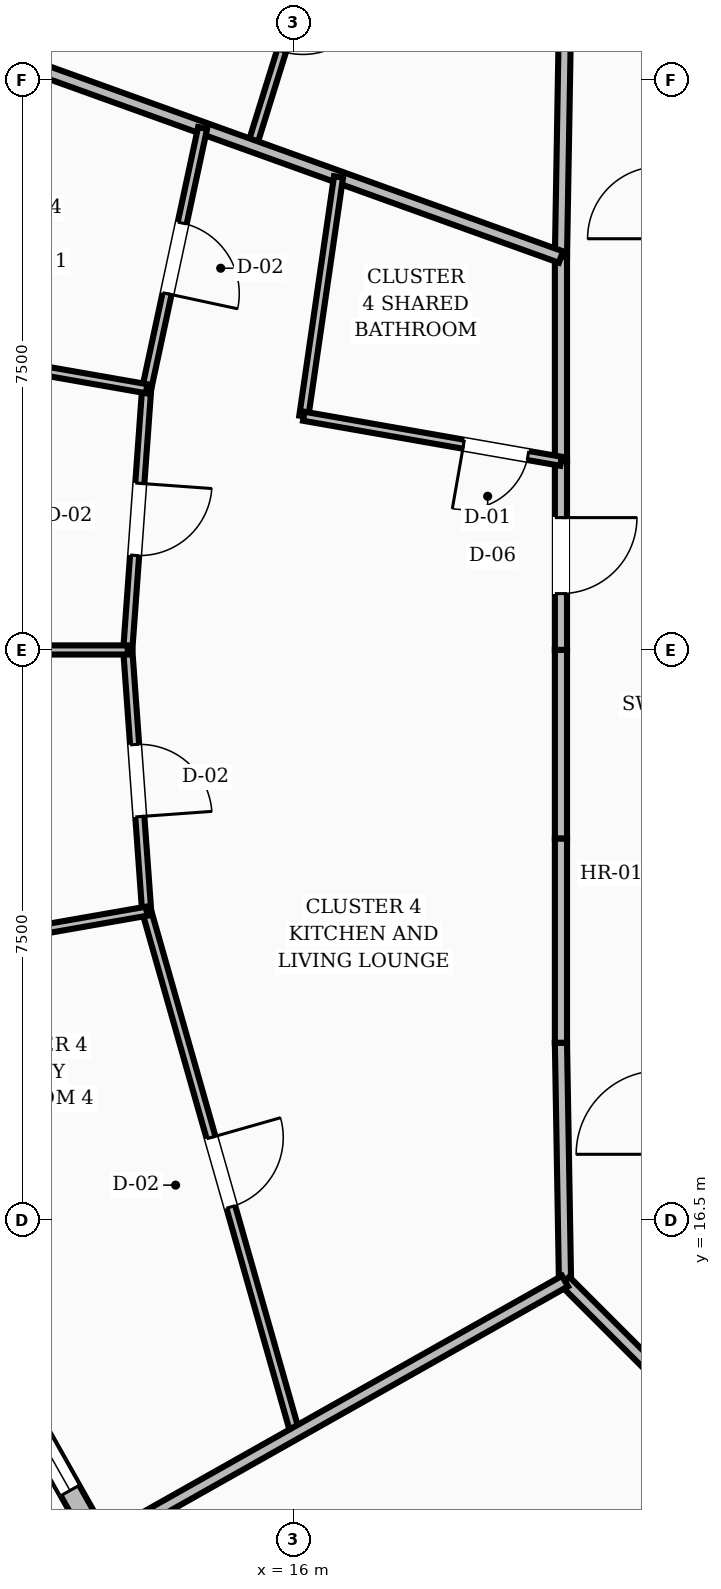
"""IFC4 building model, lengths in metres.
Left out: names, types, materials, properties, quantities, classifications, styles, units other than length and angle.
Written with IfcOpenShell. Run it as: python <this file> out.ifc"""

import sys

from ifc_helpers import new_model, si_unit, direction, frame, frame_2d, origin, place, context, subcontext, project, spatial, rectangle, extrude, element, fill, save


model = new_model("IFC4")
c1 = context("Model", 3, precision=1e-05, world=origin(), true_north=direction((0.0, 1.0)))
c2 = subcontext(c1, "Body", "Model", "MODEL_VIEW")
j1 = project(units=[si_unit("LENGTHUNIT", "METRE"), si_unit("PLANEANGLEUNIT", "RADIAN")], contexts=[c1])
p1 = place(None, origin())
s1 = spatial("IfcSite", under=j1, at=p1, CompositionType="ELEMENT")
p2 = place(p1, origin())
s2 = spatial("IfcBuilding", under=s1, at=p2, CompositionType="ELEMENT")
p3 = place(p2, frame((0.0, 0.0, 232.8)))
s3 = spatial("IfcBuildingStorey", under=s2, at=p3, CompositionType="ELEMENT", Elevation=232.8)
p4 = place(p3, frame((11.392, 15.903, 0.0), z_axis=(0.0, 0.0, 1.0), x_axis=(0.490926410902, -0.871201044007, 0.0)))
e1 = element("IfcWall", 1, at=p4, inside=s3, PredefinedType="STANDARD", context=c2, shape_type="SweptSolid", body=[
    extrude(rectangle(XDim=4.199, YDim=0.28, at=frame_2d((2.099, 0.0))), origin(), (0.0, 0.0, 1.0), 2.88),
])
p5 = place(p4, frame((0.799, 0.0, 0.8)))
e2 = element("IfcOpeningElement", 2, at=p5, cuts=e1, PredefinedType="OPENING", context=c2, shape_type="SweptSolid", body=[
    extrude(rectangle(XDim=2.6, YDim=1.65, at=frame_2d((1.3, 0.825))), frame((0.0, 0.15, 0.0), z_axis=(0.0, -1.0, 0.0), x_axis=(1.0, 0.0, 0.0)), (0.0, 0.0, 1.0), 0.3),
])
p6 = place(p3, frame((19.573, 32.303, 0.0), z_axis=(0.0, 0.0, 1.0), x_axis=(-0.016981035134, -0.999855811828, 0.0)))
e3 = element("IfcWall", 3, at=p6, inside=s3, PredefinedType="SOLIDWALL", context=c2, shape_type="SweptSolid", body=[
    extrude(rectangle(XDim=3.134, YDim=0.16, at=frame_2d((1.567, 0.0))), origin(), (0.0, 0.0, 1.0), 2.87),
])
p7 = place(p3, frame((19.52, 29.169, 0.0), z_axis=(0.0, 0.0, 1.0), x_axis=(0.0, -1.0, 0.0)))
e4 = element("IfcWall", 4, at=p7, inside=s3, PredefinedType="SOLIDWALL", context=c2, shape_type="SweptSolid", body=[
    extrude(rectangle(XDim=2.687, YDim=0.16, at=frame_2d((1.344, 0.0))), origin(), (0.0, 0.0, 1.0), 2.87),
])
p8 = place(p3, frame((19.52, 26.482, 0.0), z_axis=(0.0, 0.0, 1.0), x_axis=(0.0, -1.0, 0.0)))
e5 = element("IfcWall", 5, at=p8, inside=s3, PredefinedType="SOLIDWALL", context=c2, shape_type="SweptSolid", body=[
    extrude(rectangle(XDim=2.482, YDim=0.16, at=frame_2d((1.241, 0.0))), origin(), (0.0, 0.0, 1.0), 2.87),
])
p9 = place(p8, frame((0.741, 0.0, 0.0)))
e6 = element("IfcOpeningElement", 6, at=p9, cuts=e5, PredefinedType="OPENING", context=c2, shape_type="SweptSolid", body=[
    extrude(rectangle(XDim=1.0, YDim=2.1, at=frame_2d((0.5, 1.05))), frame((0.0, 0.09, 0.0), z_axis=(0.0, -1.0, 0.0), x_axis=(1.0, 0.0, 0.0)), (0.0, 0.0, 1.0), 0.18),
])
p10 = place(p3, frame((19.52, 24.0, 0.0), z_axis=(0.0, 0.0, 1.0), x_axis=(0.0, -1.0, 0.0)))
e7 = element("IfcWall", 7, at=p10, inside=s3, PredefinedType="SOLIDWALL", context=c2, shape_type="SweptSolid", body=[
    extrude(rectangle(XDim=2.482, YDim=0.16, at=frame_2d((1.241, 0.0))), origin(), (0.0, 0.0, 1.0), 2.87),
])
p11 = place(p3, frame((19.52, 21.518, 0.0), z_axis=(0.0, 0.0, 1.0), x_axis=(0.0, -1.0, 0.0)))
e8 = element("IfcWall", 8, at=p11, inside=s3, PredefinedType="SOLIDWALL", context=c2, shape_type="SweptSolid", body=[
    extrude(rectangle(XDim=2.687, YDim=0.16, at=frame_2d((1.344, 0.0))), origin(), (0.0, 0.0, 1.0), 2.87),
])
p12 = place(p3, frame((19.52, 18.831, 0.0), z_axis=(0.0, 0.0, 1.0), x_axis=(0.016981035134, -0.999855811828, 0.0)))
e9 = element("IfcWall", 9, at=p12, inside=s3, PredefinedType="SOLIDWALL", context=c2, shape_type="SweptSolid", body=[
    extrude(rectangle(XDim=3.134, YDim=0.16, at=frame_2d((1.567, 0.0))), origin(), (0.0, 0.0, 1.0), 2.87),
])
p13 = place(p3, frame((19.573, 15.697, 0.0), z_axis=(0.0, 0.0, 1.0), x_axis=(0.707106781187, -0.707106781187, 0.0)))
e10 = element("IfcWall", 10, at=p13, inside=s3, PredefinedType="SOLIDWALL", context=c2, shape_type="SweptSolid", body=[
    extrude(rectangle(XDim=2.916, YDim=0.16, at=frame_2d((1.458, 0.0))), origin(), (0.0, 0.0, 1.0), 2.87),
])
p14 = place(p3, frame((16.513, 34.029, 0.0), z_axis=(0.0, 0.0, 1.0), x_axis=(-0.297239013816, -0.954803104658, 0.0)))
e11 = element("IfcWall", 11, at=p14, inside=s3, PredefinedType="PARTITIONING", context=c2, shape_type="SweptSolid", body=[
    extrude(rectangle(XDim=3.556, YDim=0.12, at=frame_2d((1.778, 0.0))), origin(), (0.0, 0.0, 1.0), 2.87),
])
p15 = place(p14, frame((1.303, 0.0, 0.0)))
e12 = element("IfcOpeningElement", 12, at=p15, cuts=e11, PredefinedType="OPENING", context=c2, shape_type="SweptSolid", body=[
    extrude(rectangle(XDim=0.95, YDim=2.1, at=frame_2d((0.475, 1.05))), frame((0.0, 0.07, 0.0), z_axis=(0.0, -1.0, 0.0), x_axis=(1.0, 0.0, 0.0)), (0.0, 0.0, 1.0), 0.14),
])
p16 = place(p3, frame((19.52, 29.169, 0.0), z_axis=(0.0, 0.0, 1.0), x_axis=(-0.940833047992, 0.338870441032, 0.0)))
e13 = element("IfcWall", 13, at=p16, inside=s3, PredefinedType="SOLIDWALL", context=c2, shape_type="SweptSolid", body=[
    extrude(rectangle(XDim=8.589, YDim=0.16, at=frame_2d((4.295, 0.0))), origin(), (0.0, 0.0, 1.0), 2.87),
])
p17 = place(p3, frame((16.594, 30.223, 0.0), z_axis=(0.0, 0.0, 1.0), x_axis=(-0.14364473036, -0.98962932022, 0.0)))
e14 = element("IfcWall", 14, at=p17, inside=s3, PredefinedType="PARTITIONING", context=c2, shape_type="SweptSolid", body=[
    extrude(rectangle(XDim=3.182, YDim=0.12, at=frame_2d((1.591, 0.0))), origin(), (0.0, 0.0, 1.0), 2.87),
])
p18 = place(p3, frame((19.52, 26.482, 0.0), z_axis=(0.0, 0.0, 1.0), x_axis=(-0.985018092724, 0.172451027852, 0.0)))
e15 = element("IfcWall", 15, at=p18, inside=s3, PredefinedType="PARTITIONING", context=c2, shape_type="SweptSolid", body=[
    extrude(rectangle(XDim=3.435, YDim=0.12, at=frame_2d((1.717, 0.0))), origin(), (0.0, 0.0, 1.0), 2.87),
])
p19 = place(p18, frame((0.44, 0.0, 0.0)))
e16 = element("IfcOpeningElement", 16, at=p19, cuts=e15, PredefinedType="OPENING", context=c2, shape_type="SweptSolid", body=[
    extrude(rectangle(XDim=0.86, YDim=2.1, at=frame_2d((0.43, 1.05))), frame((0.0, 0.07, 0.0), z_axis=(0.0, -1.0, 0.0), x_axis=(1.0, 0.0, 0.0)), (0.0, 0.0, 1.0), 0.14),
])
p20 = place(p3, frame((14.806, 30.867, 0.0), z_axis=(0.0, 0.0, 1.0), x_axis=(-0.209866475618, -0.977730056003, 0.0)))
e17 = element("IfcWall", 17, at=p20, inside=s3, PredefinedType="PARTITIONING", context=c2, shape_type="SweptSolid", body=[
    extrude(rectangle(XDim=3.509, YDim=0.12, at=frame_2d((1.754, 0.0))), origin(), (0.0, 0.0, 1.0), 2.87),
])
p21 = place(p20, frame((1.279, 0.0, 0.0)))
e18 = element("IfcOpeningElement", 18, at=p21, cuts=e17, PredefinedType="OPENING", context=c2, shape_type="SweptSolid", body=[
    extrude(rectangle(XDim=0.95, YDim=2.1, at=frame_2d((0.475, 1.05))), frame((0.0, 0.07, 0.0), z_axis=(0.0, -1.0, 0.0), x_axis=(1.0, 0.0, 0.0)), (0.0, 0.0, 1.0), 0.14),
])
p22 = place(p3, frame((14.07, 27.437, 0.0), z_axis=(0.0, 0.0, 1.0), x_axis=(-0.072128186897, -0.99739537028, 0.0)))
e19 = element("IfcWall", 19, at=p22, inside=s3, PredefinedType="PARTITIONING", context=c2, shape_type="SweptSolid", body=[
    extrude(rectangle(XDim=3.446, YDim=0.12, at=frame_2d((1.723, 0.0))), origin(), (0.0, 0.0, 1.0), 2.87),
])
p23 = place(p22, frame((1.248, 0.0, 0.0)))
e20 = element("IfcOpeningElement", 20, at=p23, cuts=e19, PredefinedType="OPENING", context=c2, shape_type="SweptSolid", body=[
    extrude(rectangle(XDim=0.95, YDim=2.1, at=frame_2d((0.475, 1.05))), frame((0.0, 0.07, 0.0), z_axis=(0.0, -1.0, 0.0), x_axis=(1.0, 0.0, 0.0)), (0.0, 0.0, 1.0), 0.14),
])
p24 = place(p3, frame((14.07, 27.437, 0.0), z_axis=(0.0, 0.0, 1.0), x_axis=(-0.985016843907, 0.172458160782, 0.0)))
e21 = element("IfcWall", 21, at=p24, inside=s3, PredefinedType="PARTITIONING", context=c2, shape_type="SweptSolid", body=[
    extrude(rectangle(XDim=3.957, YDim=0.12, at=frame_2d((1.979, 0.0))), origin(), (0.0, 0.0, 1.0), 2.87),
])
p25 = place(p3, frame((13.821, 24.0, 0.0), z_axis=(0.0, 0.0, 1.0), x_axis=(0.072128186897, -0.99739537028, 0.0)))
e22 = element("IfcWall", 22, at=p25, inside=s3, PredefinedType="PARTITIONING", context=c2, shape_type="SweptSolid", body=[
    extrude(rectangle(XDim=3.446, YDim=0.12, at=frame_2d((1.723, 0.0))), origin(), (0.0, 0.0, 1.0), 2.87),
])
p26 = place(p25, frame((1.248, 0.0, 0.0)))
e23 = element("IfcOpeningElement", 23, at=p26, cuts=e22, PredefinedType="OPENING", context=c2, shape_type="SweptSolid", body=[
    extrude(rectangle(XDim=0.95, YDim=2.1, at=frame_2d((0.475, 1.05))), frame((0.0, 0.07, 0.0), z_axis=(0.0, -1.0, 0.0), x_axis=(1.0, 0.0, 0.0)), (0.0, 0.0, 1.0), 0.14),
])
p27 = place(p3, frame((13.821, 24.0, 0.0), z_axis=(0.0, 0.0, 1.0), x_axis=(-1.0, 0.0, 0.0)))
e24 = element("IfcWall", 24, at=p27, inside=s3, PredefinedType="PARTITIONING", context=c2, shape_type="SweptSolid", body=[
    extrude(rectangle(XDim=4.077, YDim=0.12, at=frame_2d((2.039, 0.0))), origin(), (0.0, 0.0, 1.0), 2.87),
])
p28 = place(p3, frame((14.07, 20.563, 0.0), z_axis=(0.0, 0.0, 1.0), x_axis=(0.273646270328, -0.961830400193, 0.0)))
e25 = element("IfcWall", 25, at=p28, inside=s3, PredefinedType="PARTITIONING", context=c2, shape_type="SweptSolid", body=[
    extrude(rectangle(XDim=7.141, YDim=0.12, at=frame_2d((3.57, 0.0))), origin(), (0.0, 0.0, 1.0), 2.87),
])
p29 = place(p28, frame((3.095, 0.0, 0.0)))
e26 = element("IfcOpeningElement", 26, at=p29, cuts=e25, PredefinedType="OPENING", context=c2, shape_type="SweptSolid", body=[
    extrude(rectangle(XDim=0.95, YDim=2.1, at=frame_2d((0.475, 1.05))), frame((0.0, 0.07, 0.0), z_axis=(0.0, -1.0, 0.0), x_axis=(1.0, 0.0, 0.0)), (0.0, 0.0, 1.0), 0.14),
])
p30 = place(p3, frame((14.07, 20.563, 0.0), z_axis=(0.0, 0.0, 1.0), x_axis=(-0.985016843907, -0.172458160782, 0.0)))
e27 = element("IfcWall", 27, at=p30, inside=s3, PredefinedType="PARTITIONING", context=c2, shape_type="SweptSolid", body=[
    extrude(rectangle(XDim=3.957, YDim=0.12, at=frame_2d((1.979, 0.0))), origin(), (0.0, 0.0, 1.0), 2.87),
])
p31 = place(p3, frame((19.573, 15.697, 0.0), z_axis=(0.0, 0.0, 1.0), x_axis=(-0.87102262413, -0.491242901479, 0.0)))
e28 = element("IfcWall", 28, at=p31, inside=s3, PredefinedType="SOLIDWALL", context=c2, shape_type="SweptSolid", body=[
    extrude(rectangle(XDim=6.976, YDim=0.16, at=frame_2d((3.488, 0.0))), origin(), (0.0, 0.0, 1.0), 2.87),
])
p32 = place(p5, origin())
e29 = element("IfcWindow", 29, at=p32, inside=s3, PartitioningType="SINGLE_PANEL", PredefinedType="WINDOW", context=c2, shape_type="SweptSolid", body=[
    extrude(rectangle(XDim=2.6, YDim=1.65, at=frame_2d((1.3, 0.825))), frame((0.0, 0.03, 0.0), z_axis=(0.0, -1.0, 0.0), x_axis=(1.0, 0.0, 0.0)), (0.0, 0.0, 1.0), 0.06),
])
fill(e2, e29)
p33 = place(p19, origin())
e30 = element("IfcDoor", 30, at=p33, inside=s3, OperationType="SINGLE_SWING_RIGHT", PredefinedType="DOOR", context=c2, shape_type="SweptSolid", body=[
    extrude(rectangle(XDim=0.86, YDim=2.1, at=frame_2d((0.43, 1.05))), frame((0.0, 0.025, 0.0), z_axis=(0.0, -1.0, 0.0), x_axis=(1.0, 0.0, 0.0)), (0.0, 0.0, 1.0), 0.05),
])
fill(e16, e30)
p34 = place(p9, origin())
e31 = element("IfcDoor", 31, at=p34, inside=s3, OperationType="SINGLE_SWING_LEFT", PredefinedType="DOOR", context=c2, shape_type="SweptSolid", body=[
    extrude(rectangle(XDim=1.0, YDim=2.1, at=frame_2d((0.5, 1.05))), frame((0.0, 0.025, 0.0), z_axis=(0.0, -1.0, 0.0), x_axis=(1.0, 0.0, 0.0)), (0.0, 0.0, 1.0), 0.05),
])
fill(e6, e31)
p35 = place(p21, origin())
e32 = element("IfcDoor", 32, at=p35, inside=s3, OperationType="SINGLE_SWING_RIGHT", PredefinedType="DOOR", context=c2, shape_type="SweptSolid", body=[
    extrude(rectangle(XDim=0.95, YDim=2.1, at=frame_2d((0.475, 1.05))), frame((0.0, 0.025, 0.0), z_axis=(0.0, -1.0, 0.0), x_axis=(1.0, 0.0, 0.0)), (0.0, 0.0, 1.0), 0.05),
])
fill(e18, e32)
p36 = place(p23, origin())
e33 = element("IfcDoor", 33, at=p36, inside=s3, OperationType="SINGLE_SWING_LEFT", PredefinedType="DOOR", context=c2, shape_type="SweptSolid", body=[
    extrude(rectangle(XDim=0.95, YDim=2.1, at=frame_2d((0.475, 1.05))), frame((0.0, 0.025, 0.0), z_axis=(0.0, -1.0, 0.0), x_axis=(1.0, 0.0, 0.0)), (0.0, 0.0, 1.0), 0.05),
])
fill(e20, e33)
p37 = place(p26, origin())
e34 = element("IfcDoor", 34, at=p37, inside=s3, OperationType="SINGLE_SWING_RIGHT", PredefinedType="DOOR", context=c2, shape_type="SweptSolid", body=[
    extrude(rectangle(XDim=0.95, YDim=2.1, at=frame_2d((0.475, 1.05))), frame((0.0, 0.025, 0.0), z_axis=(0.0, -1.0, 0.0), x_axis=(1.0, 0.0, 0.0)), (0.0, 0.0, 1.0), 0.05),
])
fill(e23, e34)
p38 = place(p29, origin())
e35 = element("IfcDoor", 35, at=p38, inside=s3, OperationType="SINGLE_SWING_LEFT", PredefinedType="DOOR", context=c2, shape_type="SweptSolid", body=[
    extrude(rectangle(XDim=0.95, YDim=2.1, at=frame_2d((0.475, 1.05))), frame((0.0, 0.025, 0.0), z_axis=(0.0, -1.0, 0.0), x_axis=(1.0, 0.0, 0.0)), (0.0, 0.0, 1.0), 0.05),
])
fill(e26, e35)
save(model, sys.argv[1])
